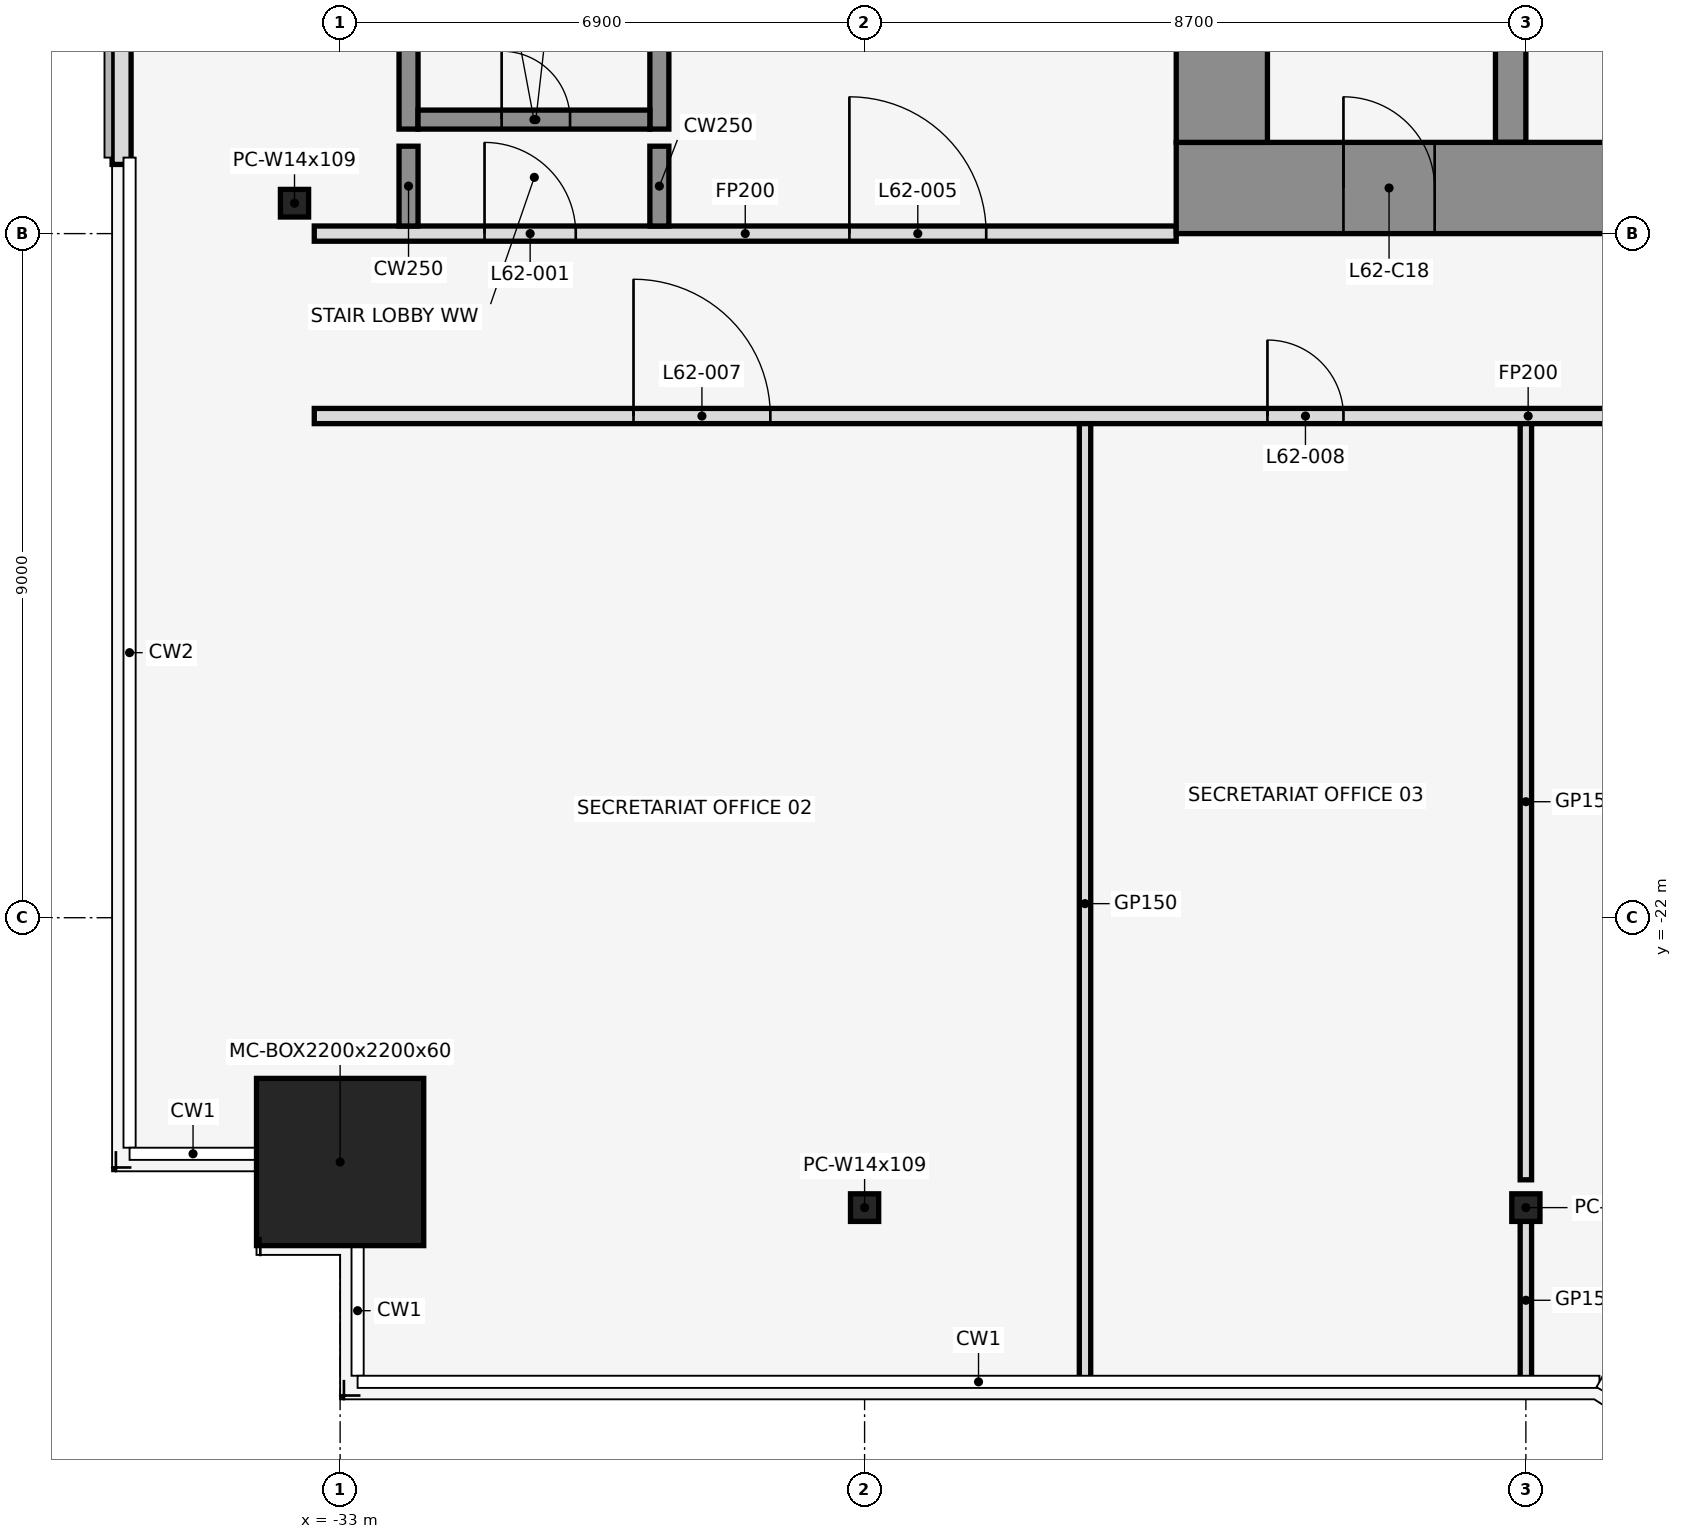
"""IFC4 building model, lengths in metres.
Left out: names, types, materials, properties, quantities, classifications, styles, units other than length and angle.
Written with IfcOpenShell. Run it as: python <this file> out.ifc"""

import sys

from ifc_helpers import new_model, si_unit, direction, frame, frame_2d, origin, origin_2d, place, context, subcontext, project, spatial, rectangle, hollow_rectangle, i_section, extrude, element, fill, save


model = new_model("IFC4")
c1 = context("Model", 3, precision=1e-05, world=origin(), true_north=direction((0.0, 1.0)))
c2 = subcontext(c1, "Body", "Model", "MODEL_VIEW")
j1 = project(units=[si_unit("LENGTHUNIT", "METRE"), si_unit("PLANEANGLEUNIT", "RADIAN")], contexts=[c1])
p1 = place(None, origin())
s1 = spatial("IfcSite", under=j1, at=p1, CompositionType="ELEMENT")
p2 = place(p1, origin())
s2 = spatial("IfcBuilding", under=s1, at=p2, CompositionType="ELEMENT")
p3 = place(p2, frame((0.0, 0.0, 275.0)))
s3 = spatial("IfcBuildingStorey", under=s2, at=p3, CompositionType="ELEMENT", Elevation=275.0)
p4 = place(p3, frame((-33.0, -25.214, 0.0), z_axis=(0.0, 0.0, 1.0), x_axis=(1.0, 0.0, 0.0)))
e1 = element("IfcColumn", 1, at=p4, inside=s3, PredefinedType="COLUMN", context=c2, shape_type="SweptSolid", body=[
    extrude(hollow_rectangle(XDim=2.2, YDim=2.2, WallThickness=0.06, at=origin_2d()), origin(), (0.0, 0.0, 1.0), 4.2),
])
for number, where, z_axis, x_axis in (
    (2, (-26.1, -25.814, 0.0), (0.0, 0.0, 1.0), (1.0, 0.0, 0.0)),
    (3, (-17.4, -25.814, 0.0), (0.0, 0.0, 1.0), (1.0, 0.0, 0.0)),
    (4, (-33.6, -12.6, 0.0), (0.0, 0.0, 1.0), (1.0, 0.0, 0.0)),
):
    element("IfcColumn", number, at=place(p3, frame(where, z_axis=z_axis, x_axis=x_axis)), inside=s3, PredefinedType="COLUMN", context=c2, shape_type="SweptSolid", body=[
        extrude(i_section(OverallWidth=0.371, OverallDepth=0.363, WebThickness=0.013, FlangeThickness=0.022, at=origin_2d()), origin(), (0.0, 0.0, 1.0), 4.2),
    ])
p5 = place(p3, frame((-35.875, -3.0, 0.0), z_axis=(0.0, 0.0, 1.0), x_axis=(0.0, -1.0, 0.0)))
e5 = element("IfcWall", 5, at=p5, inside=s3, PredefinedType="STANDARD", context=c2, shape_type="SweptSolid", body=[
    extrude(rectangle(XDim=9.09, YDim=0.25, at=frame_2d((4.545, 0.0))), origin(), (0.0, 0.0, 1.0), 4.05),
])
p6 = place(p3, frame((-32.1, -11.625, 0.0), z_axis=(0.0, 0.0, 1.0), x_axis=(0.0, 1.0, 0.0)))
e6 = element("IfcWall", 6, at=p6, inside=s3, PredefinedType="SHEAR", context=c2, shape_type="SweptSolid", body=[
    extrude(rectangle(XDim=7.525, YDim=0.25, at=frame_2d((3.762, 0.0))), origin(), (0.0, 0.0, 1.0), 4.2),
])
p7 = place(p3, frame((-28.8, -11.625, 0.0), z_axis=(0.0, 0.0, 1.0), x_axis=(0.0, 1.0, 0.0)))
e7 = element("IfcWall", 7, at=p7, inside=s3, PredefinedType="SHEAR", context=c2, shape_type="SweptSolid", body=[
    extrude(rectangle(XDim=7.25, YDim=0.25, at=frame_2d((3.625, 0.0))), origin(), (0.0, 0.0, 1.0), 4.2),
])
p8 = place(p3, frame((-31.975, -11.5, 0.0), z_axis=(0.0, 0.0, 1.0), x_axis=(1.0, 0.0, 0.0)))
e8 = element("IfcWall", 8, at=p8, inside=s3, PredefinedType="SHEAR", context=c2, shape_type="SweptSolid", body=[
    extrude(rectangle(XDim=3.05, YDim=0.25, at=frame_2d((1.525, 0.0))), origin(), (0.0, 0.0, 1.0), 4.2),
])
p9 = place(p8, frame((1.1, 0.0, 0.0)))
e9 = element("IfcOpeningElement", 9, at=p9, cuts=e8, PredefinedType="OPENING", context=c2, shape_type="SweptSolid", body=[
    extrude(rectangle(XDim=0.9, YDim=2.1, at=frame_2d((0.45, 1.05))), frame((0.0, 0.137, 0.0), z_axis=(0.0, -1.0, 0.0), x_axis=(1.0, 0.0, 0.0)), (0.0, 0.0, 1.0), 0.274),
])
p10 = place(p3, frame((-33.34, -15.4, 0.0), z_axis=(0.0, 0.0, 1.0), x_axis=(1.0, 0.0, 0.0)))
e10 = element("IfcWall", 10, at=p10, inside=s3, PredefinedType="PARTITIONING", context=c2, shape_type="SweptSolid", body=[
    extrude(rectangle(XDim=31.94, YDim=0.2, at=frame_2d((15.97, 0.0))), origin(), (0.0, 0.0, 1.0), 3.118),
])
p11 = place(p10, frame((4.2, 0.0, 0.0)))
e11 = element("IfcOpeningElement", 11, at=p11, cuts=e10, PredefinedType="OPENING", context=c2, shape_type="SweptSolid", body=[
    extrude(rectangle(XDim=1.8, YDim=2.1, at=frame_2d((0.9, 1.05))), frame((0.0, 0.112, 0.0), z_axis=(0.0, -1.0, 0.0), x_axis=(1.0, 0.0, 0.0)), (0.0, 0.0, 1.0), 0.224),
])
p12 = place(p10, frame((12.54, 0.0, 0.0)))
e12 = element("IfcOpeningElement", 12, at=p12, cuts=e10, PredefinedType="OPENING", context=c2, shape_type="SweptSolid", body=[
    extrude(rectangle(XDim=1.0, YDim=2.1, at=frame_2d((0.5, 1.05))), frame((0.0, 0.112, 0.0), z_axis=(0.0, -1.0, 0.0), x_axis=(1.0, 0.0, 0.0)), (0.0, 0.0, 1.0), 0.224),
])
p13 = place(p10, frame((20.84, 0.0, 0.0)))
e13 = element("IfcOpeningElement", 13, at=p13, cuts=e10, PredefinedType="OPENING", context=c2, shape_type="SweptSolid", body=[
    extrude(rectangle(XDim=1.8, YDim=2.1, at=frame_2d((0.9, 1.05))), frame((0.0, 0.112, 0.0), z_axis=(0.0, -1.0, 0.0), x_axis=(1.0, 0.0, 0.0)), (0.0, 0.0, 1.0), 0.224),
])
p14 = place(p3, frame((-33.34, -13.0, 0.0), z_axis=(0.0, 0.0, 1.0), x_axis=(1.0, 0.0, 0.0)))
e14 = element("IfcWall", 14, at=p14, inside=s3, PredefinedType="PARTITIONING", context=c2, shape_type="SweptSolid", body=[
    extrude(rectangle(XDim=11.34, YDim=0.2, at=frame_2d((5.67, 0.0))), origin(), (0.0, 0.0, 1.0), 3.118),
])
p15 = place(p14, frame((2.24, 0.0, 0.0)))
e15 = element("IfcOpeningElement", 15, at=p15, cuts=e14, PredefinedType="OPENING", context=c2, shape_type="SweptSolid", body=[
    extrude(rectangle(XDim=1.2, YDim=2.1, at=frame_2d((0.6, 1.05))), frame((0.0, 0.112, 0.0), z_axis=(0.0, -1.0, 0.0), x_axis=(1.0, 0.0, 0.0)), (0.0, 0.0, 1.0), 0.224),
])
p16 = place(p14, frame((7.04, 0.0, 0.0)))
e16 = element("IfcOpeningElement", 16, at=p16, cuts=e14, PredefinedType="OPENING", context=c2, shape_type="SweptSolid", body=[
    extrude(rectangle(XDim=1.8, YDim=2.1, at=frame_2d((0.9, 1.05))), frame((0.0, 0.112, 0.0), z_axis=(0.0, -1.0, 0.0), x_axis=(1.0, 0.0, 0.0)), (0.0, 0.0, 1.0), 0.224),
])
for number, where, z_axis, x_axis in (
    (17, (-32.1, -12.9, 0.0), (0.0, 0.0, 1.0), (0.0, 1.0, 0.0)),
    (18, (-28.8, -12.9, 0.0), (0.0, 0.0, 1.0), (0.0, 1.0, 0.0)),
):
    element("IfcWall", number, at=place(p3, frame(where, z_axis=z_axis, x_axis=x_axis)), inside=s3, PredefinedType="SHEAR", context=c2, shape_type="SweptSolid", body=[
        extrude(rectangle(XDim=1.05, YDim=0.25, at=frame_2d((0.525, 0.0))), origin(), (0.0, 0.0, 1.0), 4.2),
    ])
p17 = place(p3, frame((-23.2, -28.13, 0.0), z_axis=(0.0, 0.0, 1.0), x_axis=(0.0, 1.0, 0.0)))
e19 = element("IfcWall", 19, at=p17, inside=s3, PredefinedType="PARTITIONING", context=c2, shape_type="SweptSolid", body=[
    extrude(rectangle(XDim=12.63, YDim=0.15, at=frame_2d((6.315, 0.0))), origin(), (0.0, 0.0, 1.0), 3.118),
])
p18 = place(p3, frame((-17.4, -28.13, 0.0), z_axis=(0.0, 0.0, 1.0), x_axis=(0.0, 1.0, 0.0)))
e20 = element("IfcWall", 20, at=p18, inside=s3, PredefinedType="PARTITIONING", context=c2, shape_type="SweptSolid", body=[
    extrude(rectangle(XDim=2.194, YDim=0.15, at=frame_2d((1.097, 0.0))), origin(), (0.0, 0.0, 1.0), 3.118),
])
p19 = place(p3, frame((-17.4, -25.448, 0.0), z_axis=(0.0, 0.0, 1.0), x_axis=(0.0, 1.0, 0.0)))
e21 = element("IfcWall", 21, at=p19, inside=s3, PredefinedType="PARTITIONING", context=c2, shape_type="SweptSolid", body=[
    extrude(rectangle(XDim=9.948, YDim=0.15, at=frame_2d((4.974, 0.0))), origin(), (0.0, 0.0, 1.0), 3.118),
])
p20 = place(p3, frame((-17.6, -11.8, 0.0), z_axis=(0.0, 0.0, 1.0), x_axis=(0.0, 1.0, 0.0)))
e22 = element("IfcWall", 22, at=p20, inside=s3, PredefinedType="SHEAR", context=c2, shape_type="SweptSolid", body=[
    extrude(rectangle(XDim=10.6, YDim=0.4, at=frame_2d((5.3, 0.0))), origin(), (0.0, 0.0, 1.0), 4.2),
])
p21 = place(p20, frame((1.25, 0.0, 0.0)))
e23 = element("IfcOpeningElement", 23, at=p21, cuts=e22, PredefinedType="OPENING", context=c2, shape_type="SweptSolid", body=[
    extrude(rectangle(XDim=1.1, YDim=2.1, at=frame_2d((0.55, 1.05))), frame((0.0, 0.212, 0.0), z_axis=(0.0, -1.0, 0.0), x_axis=(1.0, 0.0, 0.0)), (0.0, 0.0, 1.0), 0.424),
])
p22 = place(p20, frame((3.95, 0.0, 0.0)))
e24 = element("IfcOpeningElement", 24, at=p22, cuts=e22, PredefinedType="OPENING", context=c2, shape_type="SweptSolid", body=[
    extrude(rectangle(XDim=1.1, YDim=2.1, at=frame_2d((0.55, 1.05))), frame((0.0, 0.212, 0.0), z_axis=(0.0, -1.0, 0.0), x_axis=(1.0, 0.0, 0.0)), (0.0, 0.0, 1.0), 0.424),
])
p23 = place(p3, frame((-22.0, -12.4, 0.0), z_axis=(0.0, 0.0, 1.0), x_axis=(1.0, 0.0, 0.0)))
e25 = element("IfcWall", 25, at=p23, inside=s3, PredefinedType="SHEAR", context=c2, shape_type="SweptSolid", body=[
    extrude(rectangle(XDim=44.0, YDim=1.2, at=frame_2d((22.0, 0.0))), origin(), (0.0, 0.0, 1.0), 4.2),
])
p24 = place(p23, frame((2.2, 0.0, 0.0)))
e26 = element("IfcOpeningElement", 26, at=p24, cuts=e25, PredefinedType="OPENING", context=c2, shape_type="SweptSolid", body=[
    extrude(rectangle(XDim=1.2, YDim=2.1, at=frame_2d((0.6, 1.05))), frame((0.0, 0.612, 0.0), z_axis=(0.0, -1.0, 0.0), x_axis=(1.0, 0.0, 0.0)), (0.0, 0.0, 1.0), 1.224),
])
p25 = place(p23, frame((21.4, 0.0, 0.0)))
e27 = element("IfcOpeningElement", 27, at=p25, cuts=e25, PredefinedType="OPENING", context=c2, shape_type="SweptSolid", body=[
    extrude(rectangle(XDim=1.2, YDim=2.1, at=frame_2d((0.6, 1.05))), frame((0.0, 0.612, 0.0), z_axis=(0.0, -1.0, 0.0), x_axis=(1.0, 0.0, 0.0)), (0.0, 0.0, 1.0), 1.224),
])
p26 = place(p23, frame((40.6, 0.0, 0.0)))
e28 = element("IfcOpeningElement", 28, at=p26, cuts=e25, PredefinedType="OPENING", context=c2, shape_type="SweptSolid", body=[
    extrude(rectangle(XDim=1.2, YDim=2.1, at=frame_2d((0.6, 1.05))), frame((0.0, 0.612, 0.0), z_axis=(0.0, -1.0, 0.0), x_axis=(1.0, 0.0, 0.0)), (0.0, 0.0, 1.0), 1.224),
])
p27 = place(p23, frame((16.0, 0.0, 0.0)))
e29 = element("IfcOpeningElement", 29, at=p27, cuts=e25, PredefinedType="OPENING", context=c2, shape_type="SweptSolid", body=[
    extrude(rectangle(XDim=1.8, YDim=2.1, at=frame_2d((0.9, 1.05))), frame((0.0, 0.612, 0.0), z_axis=(0.0, -1.0, 0.0), x_axis=(1.0, 0.0, 0.0)), (0.0, 0.0, 1.0), 1.224),
])
p28 = place(p23, frame((6.3, 0.0, 0.0)))
e30 = element("IfcOpeningElement", 30, at=p28, cuts=e25, PredefinedType="OPENING", context=c2, shape_type="SweptSolid", body=[
    extrude(rectangle(XDim=1.2, YDim=2.1, at=frame_2d((0.6, 1.05))), frame((0.0, 0.612, 0.0), z_axis=(0.0, -1.0, 0.0), x_axis=(1.0, 0.0, 0.0)), (0.0, 0.0, 1.0), 1.224),
])
p29 = place(p23, frame((26.2, 0.0, 0.0)))
e31 = element("IfcOpeningElement", 31, at=p29, cuts=e25, PredefinedType="OPENING", context=c2, shape_type="SweptSolid", body=[
    extrude(rectangle(XDim=1.8, YDim=2.1, at=frame_2d((0.9, 1.05))), frame((0.0, 0.612, 0.0), z_axis=(0.0, -1.0, 0.0), x_axis=(1.0, 0.0, 0.0)), (0.0, 0.0, 1.0), 1.224),
])
p30 = place(p23, frame((36.5, 0.0, 0.0)))
e32 = element("IfcOpeningElement", 32, at=p30, cuts=e25, PredefinedType="OPENING", context=c2, shape_type="SweptSolid", body=[
    extrude(rectangle(XDim=1.2, YDim=2.1, at=frame_2d((0.6, 1.05))), frame((0.0, 0.612, 0.0), z_axis=(0.0, -1.0, 0.0), x_axis=(1.0, 0.0, 0.0)), (0.0, 0.0, 1.0), 1.224),
])
p31 = place(p3, frame((-21.4, -11.8, 0.0), z_axis=(0.0, 0.0, 1.0), x_axis=(0.0, 1.0, 0.0)))
e33 = element("IfcWall", 33, at=p31, inside=s3, PredefinedType="SHEAR", context=c2, shape_type="SweptSolid", body=[
    extrude(rectangle(XDim=10.6, YDim=1.2, at=frame_2d((5.3, 0.0))), origin(), (0.0, 0.0, 1.0), 4.2),
])
p32 = place(p15, origin())
e34 = element("IfcDoor", 34, at=p32, inside=s3, OperationType="SINGLE_SWING_LEFT", PredefinedType="DOOR", context=c2, shape_type="SweptSolid", body=[
    extrude(rectangle(XDim=1.2, YDim=2.1, at=frame_2d((0.6, 1.05))), frame((0.0, 0.025, 0.0), z_axis=(0.0, -1.0, 0.0), x_axis=(1.0, 0.0, 0.0)), (0.0, 0.0, 1.0), 0.05),
])
fill(e15, e34)
p33 = place(p9, origin())
e35 = element("IfcDoor", 35, at=p33, inside=s3, OperationType="SINGLE_SWING_LEFT", PredefinedType="DOOR", context=c2, shape_type="SweptSolid", body=[
    extrude(rectangle(XDim=0.9, YDim=2.1, at=frame_2d((0.45, 1.05))), frame((0.0, 0.025, 0.0), z_axis=(0.0, -1.0, 0.0), x_axis=(1.0, 0.0, 0.0)), (0.0, 0.0, 1.0), 0.05),
])
fill(e9, e35)
p34 = place(p16, origin())
e36 = element("IfcDoor", 36, at=p34, inside=s3, OperationType="SINGLE_SWING_LEFT", PredefinedType="DOOR", context=c2, shape_type="SweptSolid", body=[
    extrude(rectangle(XDim=1.8, YDim=2.1, at=frame_2d((0.9, 1.05))), frame((0.0, 0.025, 0.0), z_axis=(0.0, -1.0, 0.0), x_axis=(1.0, 0.0, 0.0)), (0.0, 0.0, 1.0), 0.05),
])
fill(e16, e36)
p35 = place(p11, origin())
e37 = element("IfcDoor", 37, at=p35, inside=s3, OperationType="SINGLE_SWING_LEFT", PredefinedType="DOOR", context=c2, shape_type="SweptSolid", body=[
    extrude(rectangle(XDim=1.8, YDim=2.1, at=frame_2d((0.9, 1.05))), frame((0.0, 0.025, 0.0), z_axis=(0.0, -1.0, 0.0), x_axis=(1.0, 0.0, 0.0)), (0.0, 0.0, 1.0), 0.05),
])
fill(e11, e37)
p36 = place(p12, frame((1.0, 0.0, 0.0), z_axis=(0.0, 0.0, 1.0), x_axis=(-1.0, 0.0, 0.0)))
e38 = element("IfcDoor", 38, at=p36, inside=s3, OperationType="SINGLE_SWING_RIGHT", PredefinedType="DOOR", context=c2, shape_type="SweptSolid", body=[
    extrude(rectangle(XDim=1.0, YDim=2.1, at=frame_2d((0.5, 1.05))), frame((0.0, 0.025, 0.0), z_axis=(0.0, -1.0, 0.0), x_axis=(1.0, 0.0, 0.0)), (0.0, 0.0, 1.0), 0.05),
])
fill(e12, e38)
p37 = place(p24, frame((1.2, 0.0, 0.0), z_axis=(0.0, 0.0, 1.0), x_axis=(-1.0, 0.0, 0.0)))
e39 = element("IfcDoor", 39, at=p37, inside=s3, OperationType="SINGLE_SWING_RIGHT", PredefinedType="DOOR", context=c2, shape_type="SweptSolid", body=[
    extrude(rectangle(XDim=1.2, YDim=2.1, at=frame_2d((0.6, 1.05))), frame((0.0, 0.025, 0.0), z_axis=(0.0, -1.0, 0.0), x_axis=(1.0, 0.0, 0.0)), (0.0, 0.0, 1.0), 0.05),
])
fill(e26, e39)
save(model, sys.argv[1])
